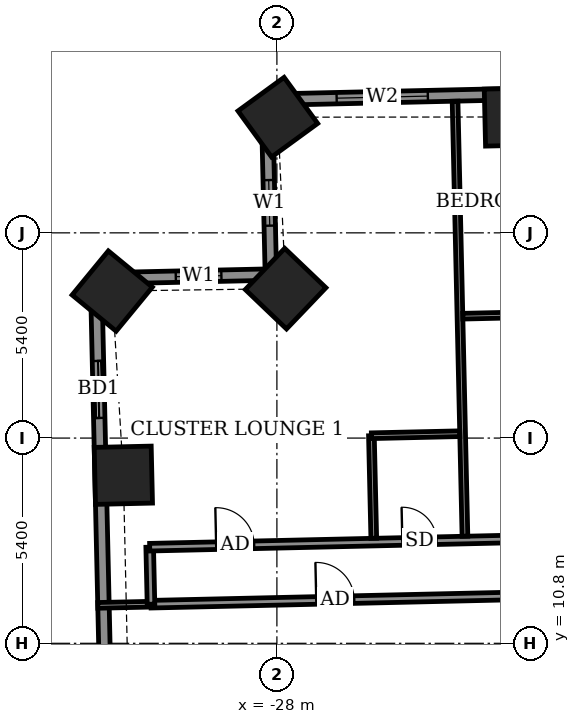
"""IFC4 building model, lengths in metres.
Left out: names, types, materials, properties, quantities, classifications, styles, units other than length and angle.
Written with IfcOpenShell. Run it as: python <this file> out.ifc"""

import sys

from ifc_helpers import new_model, si_unit, direction, frame, frame_2d, origin, origin_2d, place, context, subcontext, project, spatial, rectangle, extrude, element, fill, save


model = new_model("IFC4")
c1 = context("Model", 3, precision=1e-05, world=origin(), true_north=direction((0.0, 1.0)))
c2 = subcontext(c1, "Body", "Model", "MODEL_VIEW")
j1 = project(units=[si_unit("LENGTHUNIT", "METRE"), si_unit("PLANEANGLEUNIT", "RADIAN")], contexts=[c1])
p1 = place(None, origin())
s1 = spatial("IfcSite", under=j1, at=p1, CompositionType="ELEMENT")
p2 = place(p1, origin())
s2 = spatial("IfcBuilding", under=s1, at=p2, CompositionType="ELEMENT")
p3 = place(p2, frame((0.0, 0.0, 44.9)))
s3 = spatial("IfcBuildingStorey", under=s2, at=p3, CompositionType="ELEMENT", Elevation=44.9)
for number, where, z_axis, x_axis in (
    (1, (-21.777, 24.649, -0.55), (0.0, 0.0, 1.0), (-1.0, -0.023, 0.0)),
    (2, (-27.975, 24.643, -0.55), (0.0, 0.0, 1.0), (-0.808, -0.589, 0.0)),
    (3, (-27.771, 20.132, -0.55), (0.0, 0.0, 1.0), (-0.691, -0.723, 0.0)),
    (4, (-32.333, 20.069, -0.55), (0.0, 0.0, 1.0), (-0.635, -0.772, 0.0)),
    (5, (-32.04, 15.222, -0.55), (0.0, 0.0, 1.0), (0.023, -1.0, 0.0)),
):
    element("IfcColumn", number, at=place(p3, frame(where, z_axis=z_axis, x_axis=x_axis)), inside=s3, PredefinedType="COLUMN", context=c2, shape_type="SweptSolid", body=[
        extrude(rectangle(XDim=1.5, YDim=1.5, at=origin_2d()), origin(), (0.0, 0.0, 1.0), 3.6),
    ])
p4 = place(p3, frame((24.423, 26.298, 0.0), z_axis=(0.0, 0.0, 1.0), x_axis=(-0.999742433108, -0.022695097355, 0.0)))
e6 = element("IfcWall", 6, at=p4, inside=s3, PredefinedType="SOLIDWALL", context=c2, shape_type="SweptSolid", body=[
    extrude(rectangle(XDim=52.701, YDim=0.3, at=frame_2d((26.35, 0.0))), origin(), (0.0, 0.0, 1.0), 3.05),
])
p5 = place(p4, frame((2.009, 0.0, 0.0)))
e7 = element("IfcOpeningElement", 7, at=p5, cuts=e6, PredefinedType="OPENING", context=c2, shape_type="SweptSolid", body=[
    extrude(rectangle(XDim=1.5, YDim=2.4, at=frame_2d((0.75, 1.2))), frame((0.0, 0.16, 0.0), z_axis=(0.0, -1.0, 0.0), x_axis=(1.0, 0.0, 0.0)), (0.0, 0.0, 1.0), 0.32),
])
p6 = place(p4, frame((7.337, 0.0, 0.0)))
e8 = element("IfcOpeningElement", 8, at=p6, cuts=e6, PredefinedType="OPENING", context=c2, shape_type="SweptSolid", body=[
    extrude(rectangle(XDim=1.2, YDim=2.4, at=frame_2d((0.6, 1.2))), frame((0.0, 0.16, 0.0), z_axis=(0.0, -1.0, 0.0), x_axis=(1.0, 0.0, 0.0)), (0.0, 0.0, 1.0), 0.32),
])
p7 = place(p4, frame((10.0, 0.0, 0.0)))
e9 = element("IfcOpeningElement", 9, at=p7, cuts=e6, PredefinedType="OPENING", context=c2, shape_type="SweptSolid", body=[
    extrude(rectangle(XDim=1.5, YDim=2.4, at=frame_2d((0.75, 1.2))), frame((0.0, 0.16, 0.0), z_axis=(0.0, -1.0, 0.0), x_axis=(1.0, 0.0, 0.0)), (0.0, 0.0, 1.0), 0.32),
])
p8 = place(p4, frame((14.85, 0.0, 0.0)))
e10 = element("IfcOpeningElement", 10, at=p8, cuts=e6, PredefinedType="OPENING", context=c2, shape_type="SweptSolid", body=[
    extrude(rectangle(XDim=1.5, YDim=2.4, at=frame_2d((0.75, 1.2))), frame((0.0, 0.16, 0.0), z_axis=(0.0, -1.0, 0.0), x_axis=(1.0, 0.0, 0.0)), (0.0, 0.0, 1.0), 0.32),
])
p9 = place(p4, frame((20.638, 0.0, 0.9)))
e11 = element("IfcOpeningElement", 11, at=p9, cuts=e6, PredefinedType="OPENING", context=c2, shape_type="SweptSolid", body=[
    extrude(rectangle(XDim=0.9, YDim=1.5, at=frame_2d((0.45, 0.75))), frame((0.0, 0.16, 0.0), z_axis=(0.0, -1.0, 0.0), x_axis=(1.0, 0.0, 0.0)), (0.0, 0.0, 1.0), 0.32),
])
p10 = place(p4, frame((23.125, 0.0, 0.0)))
e12 = element("IfcOpeningElement", 12, at=p10, cuts=e6, PredefinedType="OPENING", context=c2, shape_type="SweptSolid", body=[
    extrude(rectangle(XDim=1.5, YDim=2.4, at=frame_2d((0.75, 1.2))), frame((0.0, 0.16, 0.0), z_axis=(0.0, -1.0, 0.0), x_axis=(1.0, 0.0, 0.0)), (0.0, 0.0, 1.0), 0.32),
])
p11 = place(p4, frame((27.9, 0.0, 0.0)))
e13 = element("IfcOpeningElement", 13, at=p11, cuts=e6, PredefinedType="OPENING", context=c2, shape_type="SweptSolid", body=[
    extrude(rectangle(XDim=1.5, YDim=2.4, at=frame_2d((0.75, 1.2))), frame((0.0, 0.16, 0.0), z_axis=(0.0, -1.0, 0.0), x_axis=(1.0, 0.0, 0.0)), (0.0, 0.0, 1.0), 0.32),
])
p12 = place(p4, frame((30.862, 0.0, 0.0)))
e14 = element("IfcOpeningElement", 14, at=p12, cuts=e6, PredefinedType="OPENING", context=c2, shape_type="SweptSolid", body=[
    extrude(rectangle(XDim=1.2, YDim=2.4, at=frame_2d((0.6, 1.2))), frame((0.0, 0.16, 0.0), z_axis=(0.0, -1.0, 0.0), x_axis=(1.0, 0.0, 0.0)), (0.0, 0.0, 1.0), 0.32),
])
p13 = place(p4, frame((36.1, 0.0, 0.0)))
e15 = element("IfcOpeningElement", 15, at=p13, cuts=e6, PredefinedType="OPENING", context=c2, shape_type="SweptSolid", body=[
    extrude(rectangle(XDim=1.5, YDim=2.4, at=frame_2d((0.75, 1.2))), frame((0.0, 0.16, 0.0), z_axis=(0.0, -1.0, 0.0), x_axis=(1.0, 0.0, 0.0)), (0.0, 0.0, 1.0), 0.32),
])
p14 = place(p4, frame((40.975, 0.0, 0.0)))
e16 = element("IfcOpeningElement", 16, at=p14, cuts=e6, PredefinedType="OPENING", context=c2, shape_type="SweptSolid", body=[
    extrude(rectangle(XDim=1.5, YDim=2.4, at=frame_2d((0.75, 1.2))), frame((0.0, 0.16, 0.0), z_axis=(0.0, -1.0, 0.0), x_axis=(1.0, 0.0, 0.0)), (0.0, 0.0, 1.0), 0.32),
])
p15 = place(p4, frame((43.788, 0.0, 0.0)))
e17 = element("IfcOpeningElement", 17, at=p15, cuts=e6, PredefinedType="OPENING", context=c2, shape_type="SweptSolid", body=[
    extrude(rectangle(XDim=1.5, YDim=2.4, at=frame_2d((0.75, 1.2))), frame((0.0, 0.16, 0.0), z_axis=(0.0, -1.0, 0.0), x_axis=(1.0, 0.0, 0.0)), (0.0, 0.0, 1.0), 0.32),
])
p16 = place(p4, frame((48.464, 0.0, 0.9)))
e18 = element("IfcOpeningElement", 18, at=p16, cuts=e6, PredefinedType="OPENING", context=c2, shape_type="SweptSolid", body=[
    extrude(rectangle(XDim=2.4, YDim=1.5, at=frame_2d((1.2, 0.75))), frame((0.0, 0.16, 0.0), z_axis=(0.0, -1.0, 0.0), x_axis=(1.0, 0.0, 0.0)), (0.0, 0.0, 1.0), 0.32),
])
p17 = place(p3, frame((-28.264, 25.102, 0.0), z_axis=(0.0, 0.0, 1.0), x_axis=(0.022820258049, -0.999739584003, 0.0)))
e19 = element("IfcWall", 19, at=p17, inside=s3, PredefinedType="SOLIDWALL", context=c2, shape_type="SweptSolid", body=[
    extrude(rectangle(XDim=4.6, YDim=0.3, at=frame_2d((2.3, 0.0))), origin(), (0.0, 0.0, 1.0), 2.55),
])
p18 = place(p17, frame((2.114, 0.0, 0.9)))
e20 = element("IfcOpeningElement", 20, at=p18, cuts=e19, PredefinedType="OPENING", context=c2, shape_type="SweptSolid", body=[
    extrude(rectangle(XDim=1.2, YDim=1.5, at=frame_2d((0.6, 0.75))), frame((0.0, 0.16, 0.0), z_axis=(0.0, -1.0, 0.0), x_axis=(1.0, 0.0, 0.0)), (0.0, 0.0, 1.0), 0.32),
])
p19 = place(p3, frame((-28.159, 20.503, 0.0), z_axis=(0.0, 0.0, 1.0), x_axis=(-0.999744404568, -0.02260808559, 0.0)))
e21 = element("IfcWall", 21, at=p19, inside=s3, PredefinedType="SOLIDWALL", context=c2, shape_type="SweptSolid", body=[
    extrude(rectangle(XDim=4.6, YDim=0.3, at=frame_2d((2.3, 0.0))), origin(), (0.0, 0.0, 1.0), 3.05),
])
p20 = place(p19, frame((1.302, 0.0, 0.9)))
e22 = element("IfcOpeningElement", 22, at=p20, cuts=e21, PredefinedType="OPENING", context=c2, shape_type="SweptSolid", body=[
    extrude(rectangle(XDim=1.2, YDim=1.5, at=frame_2d((0.6, 0.75))), frame((0.0, 0.16, 0.0), z_axis=(0.0, -1.0, 0.0), x_axis=(1.0, 0.0, 0.0)), (0.0, 0.0, 1.0), 0.32),
])
p21 = place(p3, frame((-32.758, 20.399, 0.0), z_axis=(0.0, 0.0, 1.0), x_axis=(0.022668485183, -0.999743036875, 0.0)))
e23 = element("IfcWall", 23, at=p21, inside=s3, PredefinedType="SOLIDWALL", context=c2, shape_type="SweptSolid", body=[
    extrude(rectangle(XDim=15.929, YDim=0.3, at=frame_2d((7.964, 0.0))), origin(), (0.0, 0.0, 1.0), 3.05),
])
p22 = place(p21, frame((2.17, 0.0, 0.0)))
e24 = element("IfcOpeningElement", 24, at=p22, cuts=e23, PredefinedType="OPENING", context=c2, shape_type="SweptSolid", body=[
    extrude(rectangle(XDim=1.5, YDim=2.4, at=frame_2d((0.75, 1.2))), frame((0.0, 0.16, 0.0), z_axis=(0.0, -1.0, 0.0), x_axis=(1.0, 0.0, 0.0)), (0.0, 0.0, 1.0), 0.32),
])
p23 = place(p21, frame((12.275, 0.0, 0.9)))
e25 = element("IfcOpeningElement", 25, at=p23, cuts=e23, PredefinedType="OPENING", context=c2, shape_type="SweptSolid", body=[
    extrude(rectangle(XDim=2.4, YDim=1.5, at=frame_2d((1.2, 0.75))), frame((0.0, 0.16, 0.0), z_axis=(0.0, -1.0, 0.0), x_axis=(1.0, 0.0, 0.0)), (0.0, 0.0, 1.0), 0.32),
])
p24 = place(p3, frame((-33.918, 7.62, 0.0), z_axis=(0.0, 0.0, 1.0), x_axis=(-0.022666865795, 0.999743073592, 0.0)))
e26 = element("IfcWall", 26, at=p24, inside=s3, PredefinedType="USERDEFINED", context=c2, shape_type="SweptSolid", body=[
    extrude(rectangle(XDim=5.999, YDim=0.55, at=frame_2d((3.0, 0.0))), origin(), (0.0, 0.0, 1.0), 0.8),
])
p25 = place(p3, frame((-32.713, 11.798, 0.0), z_axis=(0.0, 0.0, 1.0), x_axis=(0.999756172383, 0.022081571112, 0.0)))
e27 = element("IfcWall", 27, at=p25, inside=s3, PredefinedType="PARTITIONING", context=c2, shape_type="SweptSolid", body=[
    extrude(rectangle(XDim=1.404, YDim=0.15, at=frame_2d((0.702, 0.0))), origin(), (0.0, 0.0, 1.0), 2.55),
])
p26 = place(p3, frame((-31.313, 11.829, 0.0), z_axis=(0.0, 0.0, 1.0), x_axis=(0.999742346277, 0.022698921993, 0.0)))
e28 = element("IfcWall", 28, at=p26, inside=s3, PredefinedType="PARTITIONING", context=c2, shape_type="SweptSolid", body=[
    extrude(rectangle(XDim=11.1, YDim=0.2, at=frame_2d((5.55, 0.0))), origin(), (0.0, 0.0, 1.0), 3.05),
])
p27 = place(p26, frame((4.35, 0.0, 0.0)))
e29 = element("IfcOpeningElement", 29, at=p27, cuts=e28, PredefinedType="OPENING", context=c2, shape_type="SweptSolid", body=[
    extrude(rectangle(XDim=1.0, YDim=2.1, at=frame_2d((0.5, 1.05))), frame((0.0, 0.11, 0.0), z_axis=(0.0, -1.0, 0.0), x_axis=(1.0, 0.0, 0.0)), (0.0, 0.0, 1.0), 0.22),
])
p28 = place(p3, frame((-31.313, 11.829, 0.0), z_axis=(0.0, 0.0, 1.0), x_axis=(-0.022617910375, 0.999744182344, 0.0)))
e30 = element("IfcWall", 30, at=p28, inside=s3, PredefinedType="PARTITIONING", context=c2, shape_type="SweptSolid", body=[
    extrude(rectangle(XDim=1.5, YDim=0.2, at=frame_2d((0.75, 0.0))), origin(), (0.0, 0.0, 1.0), 3.05),
])
p29 = place(p3, frame((-31.347, 13.329, 0.0), z_axis=(0.0, 0.0, 1.0), x_axis=(0.999742613079, 0.022687168058, 0.0)))
e31 = element("IfcWall", 31, at=p29, inside=s3, PredefinedType="PARTITIONING", context=c2, shape_type="SweptSolid", body=[
    extrude(rectangle(XDim=58.799, YDim=0.2, at=frame_2d((29.399, 0.0))), origin(), (0.0, 0.0, 1.0), 3.05),
])
p30 = place(p29, frame((56.675, 0.0, 0.0)))
e32 = element("IfcOpeningElement", 32, at=p30, cuts=e31, PredefinedType="OPENING", context=c2, shape_type="SweptSolid", body=[
    extrude(rectangle(XDim=1.0, YDim=2.1, at=frame_2d((0.5, 1.05))), frame((0.0, 0.11, 0.0), z_axis=(0.0, -1.0, 0.0), x_axis=(1.0, 0.0, 0.0)), (0.0, 0.0, 1.0), 0.22),
])
p31 = place(p29, frame((52.4, 0.0, 0.0)))
e33 = element("IfcOpeningElement", 33, at=p31, cuts=e31, PredefinedType="OPENING", context=c2, shape_type="SweptSolid", body=[
    extrude(rectangle(XDim=0.9, YDim=2.1, at=frame_2d((0.45, 1.05))), frame((0.0, 0.11, 0.0), z_axis=(0.0, -1.0, 0.0), x_axis=(1.0, 0.0, 0.0)), (0.0, 0.0, 1.0), 0.22),
])
p32 = place(p29, frame((47.7, 0.0, 0.0)))
e34 = element("IfcOpeningElement", 34, at=p32, cuts=e31, PredefinedType="OPENING", context=c2, shape_type="SweptSolid", body=[
    extrude(rectangle(XDim=0.9, YDim=2.1, at=frame_2d((0.45, 1.05))), frame((0.0, 0.11, 0.0), z_axis=(0.0, -1.0, 0.0), x_axis=(1.0, 0.0, 0.0)), (0.0, 0.0, 1.0), 0.22),
])
p33 = place(p29, frame((45.7, 0.0, 0.0)))
e35 = element("IfcOpeningElement", 35, at=p33, cuts=e31, PredefinedType="OPENING", context=c2, shape_type="SweptSolid", body=[
    extrude(rectangle(XDim=0.9, YDim=2.1, at=frame_2d((0.45, 1.05))), frame((0.0, 0.11, 0.0), z_axis=(0.0, -1.0, 0.0), x_axis=(1.0, 0.0, 0.0)), (0.0, 0.0, 1.0), 0.22),
])
p34 = place(p29, frame((38.95, 0.0, 0.0)))
e36 = element("IfcOpeningElement", 36, at=p34, cuts=e31, PredefinedType="OPENING", context=c2, shape_type="SweptSolid", body=[
    extrude(rectangle(XDim=0.9, YDim=2.1, at=frame_2d((0.45, 1.05))), frame((0.0, 0.11, 0.0), z_axis=(0.0, -1.0, 0.0), x_axis=(1.0, 0.0, 0.0)), (0.0, 0.0, 1.0), 0.22),
])
p35 = place(p29, frame((37.05, 0.0, 0.0)))
e37 = element("IfcOpeningElement", 37, at=p35, cuts=e31, PredefinedType="OPENING", context=c2, shape_type="SweptSolid", body=[
    extrude(rectangle(XDim=0.9, YDim=2.1, at=frame_2d((0.45, 1.05))), frame((0.0, 0.11, 0.0), z_axis=(0.0, -1.0, 0.0), x_axis=(1.0, 0.0, 0.0)), (0.0, 0.0, 1.0), 0.22),
])
p36 = place(p29, frame((30.375, 0.0, 0.0)))
e38 = element("IfcOpeningElement", 38, at=p36, cuts=e31, PredefinedType="OPENING", context=c2, shape_type="SweptSolid", body=[
    extrude(rectangle(XDim=0.9, YDim=2.1, at=frame_2d((0.45, 1.05))), frame((0.0, 0.11, 0.0), z_axis=(0.0, -1.0, 0.0), x_axis=(1.0, 0.0, 0.0)), (0.0, 0.0, 1.0), 0.22),
])
p37 = place(p29, frame((28.5, 0.0, 0.0)))
e39 = element("IfcOpeningElement", 39, at=p37, cuts=e31, PredefinedType="OPENING", context=c2, shape_type="SweptSolid", body=[
    extrude(rectangle(XDim=0.9, YDim=2.1, at=frame_2d((0.45, 1.05))), frame((0.0, 0.11, 0.0), z_axis=(0.0, -1.0, 0.0), x_axis=(1.0, 0.0, 0.0)), (0.0, 0.0, 1.0), 0.22),
])
p38 = place(p29, frame((21.825, 0.0, 0.0)))
e40 = element("IfcOpeningElement", 40, at=p38, cuts=e31, PredefinedType="OPENING", context=c2, shape_type="SweptSolid", body=[
    extrude(rectangle(XDim=0.9, YDim=2.1, at=frame_2d((0.45, 1.05))), frame((0.0, 0.11, 0.0), z_axis=(0.0, -1.0, 0.0), x_axis=(1.0, 0.0, 0.0)), (0.0, 0.0, 1.0), 0.22),
])
p39 = place(p29, frame((19.95, 0.0, 0.0)))
e41 = element("IfcOpeningElement", 41, at=p39, cuts=e31, PredefinedType="OPENING", context=c2, shape_type="SweptSolid", body=[
    extrude(rectangle(XDim=0.9, YDim=2.1, at=frame_2d((0.45, 1.05))), frame((0.0, 0.11, 0.0), z_axis=(0.0, -1.0, 0.0), x_axis=(1.0, 0.0, 0.0)), (0.0, 0.0, 1.0), 0.22),
])
p40 = place(p29, frame((13.225, 0.0, 0.0)))
e42 = element("IfcOpeningElement", 42, at=p40, cuts=e31, PredefinedType="OPENING", context=c2, shape_type="SweptSolid", body=[
    extrude(rectangle(XDim=0.9, YDim=2.1, at=frame_2d((0.45, 1.05))), frame((0.0, 0.11, 0.0), z_axis=(0.0, -1.0, 0.0), x_axis=(1.0, 0.0, 0.0)), (0.0, 0.0, 1.0), 0.22),
])
p41 = place(p29, frame((11.25, 0.0, 0.0)))
e43 = element("IfcOpeningElement", 43, at=p41, cuts=e31, PredefinedType="OPENING", context=c2, shape_type="SweptSolid", body=[
    extrude(rectangle(XDim=0.9, YDim=2.1, at=frame_2d((0.45, 1.05))), frame((0.0, 0.11, 0.0), z_axis=(0.0, -1.0, 0.0), x_axis=(1.0, 0.0, 0.0)), (0.0, 0.0, 1.0), 0.22),
])
p42 = place(p29, frame((1.75, 0.0, 0.0)))
e44 = element("IfcOpeningElement", 44, at=p42, cuts=e31, PredefinedType="OPENING", context=c2, shape_type="SweptSolid", body=[
    extrude(rectangle(XDim=1.0, YDim=2.1, at=frame_2d((0.5, 1.05))), frame((0.0, 0.11, 0.0), z_axis=(0.0, -1.0, 0.0), x_axis=(1.0, 0.0, 0.0)), (0.0, 0.0, 1.0), 0.22),
])
p43 = place(p29, frame((6.65, 0.0, 0.0)))
e45 = element("IfcOpeningElement", 45, at=p43, cuts=e31, PredefinedType="OPENING", context=c2, shape_type="SweptSolid", body=[
    extrude(rectangle(XDim=0.9, YDim=2.1, at=frame_2d((0.45, 1.05))), frame((0.0, 0.11, 0.0), z_axis=(0.0, -1.0, 0.0), x_axis=(1.0, 0.0, 0.0)), (0.0, 0.0, 1.0), 0.22),
])
p44 = place(p3, frame((-25.451, 13.563, 0.0), z_axis=(0.0, 0.0, 1.0), x_axis=(-0.022969966847, 0.999736155505, 0.0)))
e46 = element("IfcWall", 46, at=p44, inside=s3, PredefinedType="PARTITIONING", context=c2, shape_type="SweptSolid", body=[
    extrude(rectangle(XDim=2.7, YDim=0.15, at=frame_2d((1.35, 0.0))), origin(), (0.0, 0.0, 1.0), 3.05),
])
p45 = place(p3, frame((-23.052, 13.617, 0.0), z_axis=(0.0, 0.0, 1.0), x_axis=(-0.022708327922, 0.999742132674, 0.0)))
e47 = element("IfcWall", 47, at=p45, inside=s3, PredefinedType="PARTITIONING", context=c2, shape_type="SweptSolid", body=[
    extrude(rectangle(XDim=11.45, YDim=0.15, at=frame_2d((5.725, 0.0))), origin(), (0.0, 0.0, 1.0), 2.55),
])
p46 = place(p3, frame((-25.513, 16.262, 0.0), z_axis=(0.0, 0.0, 1.0), x_axis=(0.999740478815, 0.022781023197, 0.0)))
e48 = element("IfcWall", 48, at=p46, inside=s3, PredefinedType="PARTITIONING", context=c2, shape_type="SweptSolid", body=[
    extrude(rectangle(XDim=2.325, YDim=0.15, at=frame_2d((1.163, 0.0))), origin(), (0.0, 0.0, 1.0), 3.05),
])
p47 = place(p3, frame((-23.108, 19.407, 0.0), z_axis=(0.0, 0.0, 1.0), x_axis=(0.999740260747, 0.02279059109, 0.0)))
e49 = element("IfcWall", 49, at=p47, inside=s3, PredefinedType="PARTITIONING", context=c2, shape_type="SweptSolid", body=[
    extrude(rectangle(XDim=2.324, YDim=0.15, at=frame_2d((1.162, 0.0))), origin(), (0.0, 0.0, 1.0), 3.05),
])
p48 = place(p16, origin())
e50 = element("IfcWindow", 50, at=p48, inside=s3, PartitioningType="DOUBLE_PANEL_VERTICAL", PredefinedType="WINDOW", context=c2, shape_type="SweptSolid", body=[
    extrude(rectangle(XDim=2.4, YDim=1.5, at=frame_2d((1.2, 0.75))), frame((0.0, 0.03, 0.0), z_axis=(0.0, -1.0, 0.0), x_axis=(1.0, 0.0, 0.0)), (0.0, 0.0, 1.0), 0.06),
])
fill(e18, e50)
p49 = place(p18, origin())
e51 = element("IfcWindow", 51, at=p49, inside=s3, PartitioningType="SINGLE_PANEL", PredefinedType="WINDOW", context=c2, shape_type="SweptSolid", body=[
    extrude(rectangle(XDim=1.2, YDim=1.5, at=frame_2d((0.6, 0.75))), frame((0.0, 0.03, 0.0), z_axis=(0.0, -1.0, 0.0), x_axis=(1.0, 0.0, 0.0)), (0.0, 0.0, 1.0), 0.06),
])
fill(e20, e51)
p50 = place(p20, origin())
e52 = element("IfcWindow", 52, at=p50, inside=s3, PartitioningType="SINGLE_PANEL", PredefinedType="WINDOW", context=c2, shape_type="SweptSolid", body=[
    extrude(rectangle(XDim=1.2, YDim=1.5, at=frame_2d((0.6, 0.75))), frame((0.0, 0.03, 0.0), z_axis=(0.0, -1.0, 0.0), x_axis=(1.0, 0.0, 0.0)), (0.0, 0.0, 1.0), 0.06),
])
fill(e22, e52)
p51 = place(p22, origin())
e53 = element("IfcDoor", 53, at=p51, inside=s3, OperationType="SLIDING_TO_LEFT", PredefinedType="DOOR", context=c2, shape_type="SweptSolid", body=[
    extrude(rectangle(XDim=1.5, YDim=2.4, at=frame_2d((0.75, 1.2))), frame((0.0, 0.025, 0.0), z_axis=(0.0, -1.0, 0.0), x_axis=(1.0, 0.0, 0.0)), (0.0, 0.0, 1.0), 0.05),
])
fill(e24, e53)
p52 = place(p42, origin())
e54 = element("IfcDoor", 54, at=p52, inside=s3, OperationType="SINGLE_SWING_LEFT", PredefinedType="DOOR", context=c2, shape_type="SweptSolid", body=[
    extrude(rectangle(XDim=1.0, YDim=2.1, at=frame_2d((0.5, 1.05))), frame((0.0, 0.025, 0.0), z_axis=(0.0, -1.0, 0.0), x_axis=(1.0, 0.0, 0.0)), (0.0, 0.0, 1.0), 0.05),
])
fill(e44, e54)
p53 = place(p43, origin())
e55 = element("IfcDoor", 55, at=p53, inside=s3, OperationType="SINGLE_SWING_LEFT", PredefinedType="DOOR", context=c2, shape_type="SweptSolid", body=[
    extrude(rectangle(XDim=0.9, YDim=2.1, at=frame_2d((0.45, 1.05))), frame((0.0, 0.025, 0.0), z_axis=(0.0, -1.0, 0.0), x_axis=(1.0, 0.0, 0.0)), (0.0, 0.0, 1.0), 0.05),
])
fill(e45, e55)
p54 = place(p27, origin())
e56 = element("IfcDoor", 56, at=p54, inside=s3, OperationType="SINGLE_SWING_RIGHT", PredefinedType="DOOR", context=c2, shape_type="SweptSolid", body=[
    extrude(rectangle(XDim=1.0, YDim=2.1, at=frame_2d((0.5, 1.05))), frame((0.0, 0.025, 0.0), z_axis=(0.0, -1.0, 0.0), x_axis=(1.0, 0.0, 0.0)), (0.0, 0.0, 1.0), 0.05),
])
fill(e29, e56)
save(model, sys.argv[1])
